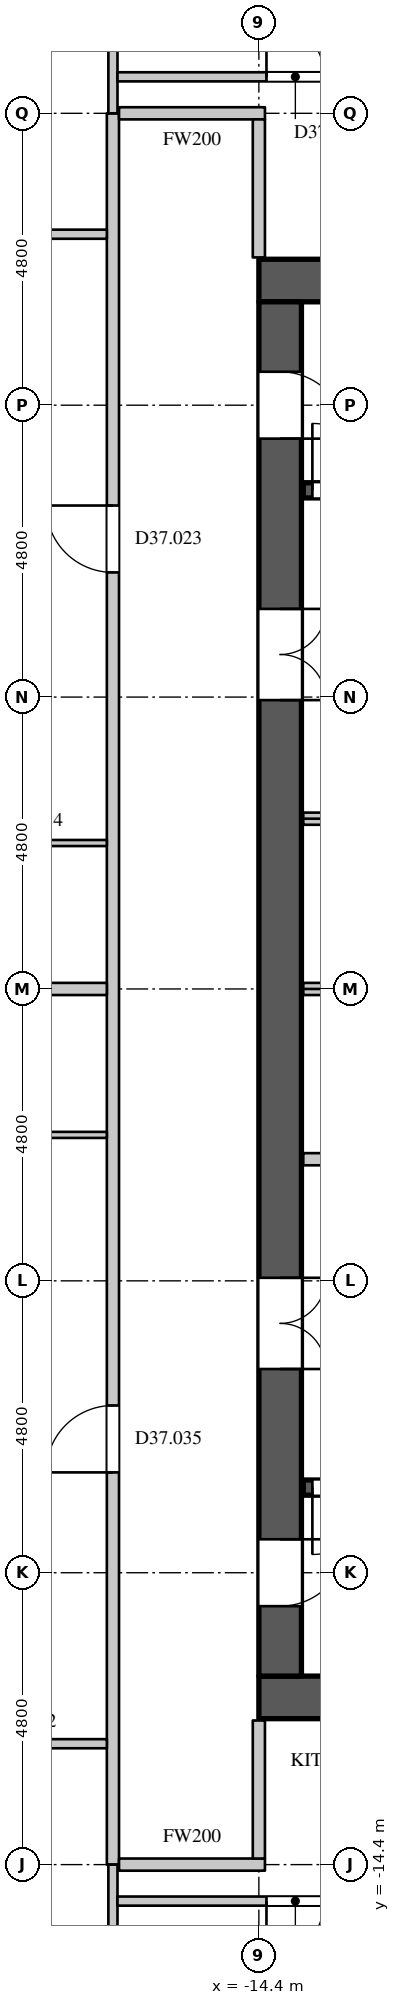
"""IFC4 building model, lengths in metres.
Left out: names, types, materials, properties, quantities, classifications, styles, units other than length and angle.
Written with IfcOpenShell. Run it as: python <this file> out.ifc"""

import sys

from ifc_helpers import new_model, si_unit, direction, frame, frame_2d, origin, place, context, subcontext, project, spatial, rectangle, extrude, element, fill, save


model = new_model("IFC4")
c1 = context("Model", 3, precision=1e-05, world=origin(), true_north=direction((0.0, 1.0)))
c2 = subcontext(c1, "Body", "Model", "MODEL_VIEW")
j1 = project(units=[si_unit("LENGTHUNIT", "METRE"), si_unit("PLANEANGLEUNIT", "RADIAN")], contexts=[c1])
p1 = place(None, origin())
s1 = spatial("IfcSite", under=j1, at=p1, CompositionType="ELEMENT")
p2 = place(p1, origin())
s2 = spatial("IfcBuilding", under=s1, at=p2, CompositionType="ELEMENT")
p3 = place(p2, frame((0.0, 0.0, 162.3)))
s3 = spatial("IfcBuildingStorey", under=s2, at=p3, CompositionType="ELEMENT", Elevation=162.3)
for number, where, z_axis, x_axis in (
    (1, (-14.4, 11.65, 0.0), (0.0, 0.0, 1.0), (1.0, 0.0, 0.0)),
    (2, (-14.4, -11.65, 0.0), (0.0, 0.0, 1.0), (1.0, 0.0, 0.0)),
):
    element("IfcWall", number, at=place(p3, frame(where, z_axis=z_axis, x_axis=x_axis)), inside=s3, PredefinedType="SHEAR", context=c2, shape_type="SweptSolid", body=[
        extrude(rectangle(XDim=28.8, YDim=0.7, at=frame_2d((14.4, 0.0))), origin(), (0.0, 0.0, 1.0), 4.2),
    ])
p4 = place(p3, frame((-14.05, -11.3, 0.0), z_axis=(0.0, 0.0, 1.0), x_axis=(0.0, 1.0, 0.0)))
e3 = element("IfcWall", 3, at=p4, inside=s3, PredefinedType="SHEAR", context=c2, shape_type="SweptSolid", body=[
    extrude(rectangle(XDim=22.6, YDim=0.7, at=frame_2d((11.3, 0.0))), origin(), (0.0, 0.0, 1.0), 4.2),
])
p5 = place(p4, frame((20.35, 0.0, 0.0)))
e4 = element("IfcOpeningElement", 4, at=p5, cuts=e3, PredefinedType="OPENING", context=c2, shape_type="SweptSolid", body=[
    extrude(rectangle(XDim=1.1, YDim=2.2, at=frame_2d((0.55, 1.1))), frame((0.0, 0.36, 0.0), z_axis=(0.0, -1.0, 0.0), x_axis=(1.0, 0.0, 0.0)), (0.0, 0.0, 1.0), 0.72),
])
p6 = place(p4, frame((1.15, 0.0, 0.0)))
e5 = element("IfcOpeningElement", 5, at=p6, cuts=e3, PredefinedType="OPENING", context=c2, shape_type="SweptSolid", body=[
    extrude(rectangle(XDim=1.1, YDim=2.2, at=frame_2d((0.55, 1.1))), frame((0.0, 0.36, 0.0), z_axis=(0.0, -1.0, 0.0), x_axis=(1.0, 0.0, 0.0)), (0.0, 0.0, 1.0), 0.72),
])
p7 = place(p4, frame((16.05, 0.0, 0.0)))
e6 = element("IfcOpeningElement", 6, at=p7, cuts=e3, PredefinedType="OPENING", context=c2, shape_type="SweptSolid", body=[
    extrude(rectangle(XDim=1.5, YDim=2.4, at=frame_2d((0.75, 1.2))), frame((0.0, 0.36, 0.0), z_axis=(0.0, -1.0, 0.0), x_axis=(1.0, 0.0, 0.0)), (0.0, 0.0, 1.0), 0.72),
])
p8 = place(p4, frame((5.05, 0.0, 0.0)))
e7 = element("IfcOpeningElement", 7, at=p8, cuts=e3, PredefinedType="OPENING", context=c2, shape_type="SweptSolid", body=[
    extrude(rectangle(XDim=1.5, YDim=2.4, at=frame_2d((0.75, 1.2))), frame((0.0, 0.36, 0.0), z_axis=(0.0, -1.0, 0.0), x_axis=(1.0, 0.0, 0.0)), (0.0, 0.0, 1.0), 0.72),
])
p9 = place(p3, frame((-16.8, -14.4, 0.0), z_axis=(0.0, 0.0, 1.0), x_axis=(0.0, 1.0, 0.0)))
e8 = element("IfcWall", 8, at=p9, inside=s3, PredefinedType="PARTITIONING", context=c2, shape_type="SweptSolid", body=[
    extrude(rectangle(XDim=28.8, YDim=0.2, at=frame_2d((14.4, 0.0))), origin(), (0.0, 0.0, 1.0), 3.95),
])
p10 = place(p9, frame((21.25, 0.0, 0.0)))
e9 = element("IfcOpeningElement", 9, at=p10, cuts=e8, PredefinedType="OPENING", context=c2, shape_type="SweptSolid", body=[
    extrude(rectangle(XDim=1.1, YDim=2.4, at=frame_2d((0.55, 1.2))), frame((0.0, 0.11, 0.0), z_axis=(0.0, -1.0, 0.0), x_axis=(1.0, 0.0, 0.0)), (0.0, 0.0, 1.0), 0.22),
])
p11 = place(p9, frame((6.45, 0.0, 0.0)))
e10 = element("IfcOpeningElement", 10, at=p11, cuts=e8, PredefinedType="OPENING", context=c2, shape_type="SweptSolid", body=[
    extrude(rectangle(XDim=1.1, YDim=2.4, at=frame_2d((0.55, 1.2))), frame((0.0, 0.11, 0.0), z_axis=(0.0, -1.0, 0.0), x_axis=(1.0, 0.0, 0.0)), (0.0, 0.0, 1.0), 0.22),
])
for number, where, z_axis, x_axis in (
    (11, (-16.7, -14.4, 0.0), (0.0, 0.0, 1.0), (1.0, 0.0, 0.0)),
    (12, (-16.7, 14.4, 0.0), (0.0, 0.0, 1.0), (1.0, 0.0, 0.0)),
):
    element("IfcWall", number, at=place(p3, frame(where, z_axis=z_axis, x_axis=x_axis)), inside=s3, PredefinedType="PARTITIONING", context=c2, shape_type="SweptSolid", body=[
        extrude(rectangle(XDim=2.4, YDim=0.2, at=frame_2d((1.2, 0.0))), origin(), (0.0, 0.0, 1.0), 3.95),
    ])
for number, where, z_axis, x_axis in (
    (13, (-14.4, -14.3, 0.0), (0.0, 0.0, 1.0), (0.0, 1.0, 0.0)),
    (14, (-14.4, 12.03, 0.0), (0.0, 0.0, 1.0), (0.0, 1.0, 0.0)),
):
    element("IfcWall", number, at=place(p3, frame(where, z_axis=z_axis, x_axis=x_axis)), inside=s3, PredefinedType="PARTITIONING", context=c2, shape_type="SweptSolid", body=[
        extrude(rectangle(XDim=2.27, YDim=0.2, at=frame_2d((1.135, 0.0))), origin(), (0.0, 0.0, 1.0), 3.95),
    ])
p12 = place(p3, frame((-22.538, -12.412, 0.0), z_axis=(0.0, 0.0, 1.0), x_axis=(1.0, 0.0, 0.0)))
e15 = element("IfcWall", 15, at=p12, inside=s3, PredefinedType="PARTITIONING", context=c2, shape_type="SweptSolid", body=[
    extrude(rectangle(XDim=5.638, YDim=0.15, at=frame_2d((2.819, 0.0))), origin(), (0.0, 0.0, 1.0), 3.95),
])
p13 = place(p12, frame((3.419, 0.0, 0.0)))
e16 = element("IfcOpeningElement", 16, at=p13, cuts=e15, PredefinedType="OPENING", context=c2, shape_type="SweptSolid", body=[
    extrude(rectangle(XDim=0.95, YDim=2.2, at=frame_2d((0.475, 1.1))), frame((0.0, 0.085, 0.0), z_axis=(0.0, -1.0, 0.0), x_axis=(1.0, 0.0, 0.0)), (0.0, 0.0, 1.0), 0.17),
])
p14 = place(p3, frame((-22.538, 12.412, 0.0), z_axis=(0.0, 0.0, 1.0), x_axis=(1.0, 0.0, 0.0)))
e17 = element("IfcWall", 17, at=p14, inside=s3, PredefinedType="PARTITIONING", context=c2, shape_type="SweptSolid", body=[
    extrude(rectangle(XDim=5.638, YDim=0.15, at=frame_2d((2.819, 0.0))), origin(), (0.0, 0.0, 1.0), 3.95),
])
p15 = place(p14, frame((3.419, 0.0, 0.0)))
e18 = element("IfcOpeningElement", 18, at=p15, cuts=e17, PredefinedType="OPENING", context=c2, shape_type="SweptSolid", body=[
    extrude(rectangle(XDim=0.95, YDim=2.2, at=frame_2d((0.475, 1.1))), frame((0.0, 0.085, 0.0), z_axis=(0.0, -1.0, 0.0), x_axis=(1.0, 0.0, 0.0)), (0.0, 0.0, 1.0), 0.17),
])
p16 = place(p3, frame((-16.8, -18.131, 0.0), z_axis=(0.0, 0.0, 1.0), x_axis=(0.0, 1.0, 0.0)))
e19 = element("IfcWall", 19, at=p16, inside=s3, PredefinedType="PARTITIONING", context=c2, shape_type="SweptSolid", body=[
    extrude(rectangle(XDim=3.731, YDim=0.15, at=frame_2d((1.865, 0.0))), origin(), (0.0, 0.0, 1.0), 3.95),
])
p17 = place(p16, frame((1.15, 0.0, 0.0)))
e20 = element("IfcOpeningElement", 20, at=p17, cuts=e19, PredefinedType="OPENING", context=c2, shape_type="SweptSolid", body=[
    extrude(rectangle(XDim=0.95, YDim=2.2, at=frame_2d((0.475, 1.1))), frame((0.0, 0.085, 0.0), z_axis=(0.0, -1.0, 0.0), x_axis=(1.0, 0.0, 0.0)), (0.0, 0.0, 1.0), 0.17),
])
p18 = place(p3, frame((-16.725, -15.0, 0.0), z_axis=(0.0, 0.0, 1.0), x_axis=(1.0, 0.0, 0.0)))
e21 = element("IfcWall", 21, at=p18, inside=s3, PredefinedType="PARTITIONING", context=c2, shape_type="SweptSolid", body=[
    extrude(rectangle(XDim=5.051, YDim=0.15, at=frame_2d((2.525, 0.0))), origin(), (0.0, 0.0, 1.0), 3.95),
])
p19 = place(p18, frame((2.45, 0.0, 0.0)))
e22 = element("IfcOpeningElement", 22, at=p19, cuts=e21, PredefinedType="OPENING", context=c2, shape_type="SweptSolid", body=[
    extrude(rectangle(XDim=0.95, YDim=2.2, at=frame_2d((0.475, 1.1))), frame((0.0, 0.085, 0.0), z_axis=(0.0, -1.0, 0.0), x_axis=(1.0, 0.0, 0.0)), (0.0, 0.0, 1.0), 0.17),
])
p20 = place(p3, frame((-16.8, 14.4, 0.0), z_axis=(0.0, 0.0, 1.0), x_axis=(0.0, 1.0, 0.0)))
e23 = element("IfcWall", 23, at=p20, inside=s3, PredefinedType="PARTITIONING", context=c2, shape_type="SweptSolid", body=[
    extrude(rectangle(XDim=3.731, YDim=0.15, at=frame_2d((1.865, 0.0))), origin(), (0.0, 0.0, 1.0), 3.95),
])
p21 = place(p20, frame((1.6, 0.0, 0.0)))
e24 = element("IfcOpeningElement", 24, at=p21, cuts=e23, PredefinedType="OPENING", context=c2, shape_type="SweptSolid", body=[
    extrude(rectangle(XDim=0.95, YDim=2.2, at=frame_2d((0.475, 1.1))), frame((0.0, 0.085, 0.0), z_axis=(0.0, -1.0, 0.0), x_axis=(1.0, 0.0, 0.0)), (0.0, 0.0, 1.0), 0.17),
])
p22 = place(p3, frame((-16.725, 15.0, 0.0), z_axis=(0.0, 0.0, 1.0), x_axis=(1.0, 0.0, 0.0)))
e25 = element("IfcWall", 25, at=p22, inside=s3, PredefinedType="PARTITIONING", context=c2, shape_type="SweptSolid", body=[
    extrude(rectangle(XDim=5.051, YDim=0.15, at=frame_2d((2.525, 0.0))), origin(), (0.0, 0.0, 1.0), 3.95),
])
p23 = place(p22, frame((2.45, 0.0, 0.0)))
e26 = element("IfcOpeningElement", 26, at=p23, cuts=e25, PredefinedType="OPENING", context=c2, shape_type="SweptSolid", body=[
    extrude(rectangle(XDim=0.95, YDim=2.2, at=frame_2d((0.475, 1.1))), frame((0.0, 0.085, 0.0), z_axis=(0.0, -1.0, 0.0), x_axis=(1.0, 0.0, 0.0)), (0.0, 0.0, 1.0), 0.17),
])
p24 = place(p3, frame((-24.055, 0.0, 0.0), z_axis=(0.0, 0.0, 1.0), x_axis=(1.0, 0.0, 0.0)))
e27 = element("IfcWall", 27, at=p24, inside=s3, PredefinedType="PARTITIONING", context=c2, shape_type="SweptSolid", body=[
    extrude(rectangle(XDim=7.155, YDim=0.2, at=frame_2d((3.578, 0.0))), origin(), (0.0, 0.0, 1.0), 3.95),
])
p25 = place(p3, frame((-13.67, -2.8, 0.0), z_axis=(0.0, 0.0, 1.0), x_axis=(1.0, 0.0, 0.0)))
e28 = element("IfcWall", 28, at=p25, inside=s3, PredefinedType="PARTITIONING", context=c2, shape_type="SweptSolid", body=[
    extrude(rectangle(XDim=3.27, YDim=0.2, at=frame_2d((1.635, 0.0))), origin(), (0.0, 0.0, 1.0), 3.95),
])
p26 = place(p25, frame((1.3, 0.0, 0.0)))
e29 = element("IfcOpeningElement", 29, at=p26, cuts=e28, PredefinedType="OPENING", context=c2, shape_type="SweptSolid", body=[
    extrude(rectangle(XDim=0.6, YDim=2.0, at=frame_2d((0.3, 1.0))), frame((0.0, 0.11, 0.0), z_axis=(0.0, -1.0, 0.0), x_axis=(1.0, 0.0, 0.0)), (0.0, 0.0, 1.0), 0.22),
])
p27 = place(p3, frame((-13.67, 0.0, 0.0), z_axis=(0.0, 0.0, 1.0), x_axis=(1.0, 0.0, 0.0)))
e30 = element("IfcWall", 30, at=p27, inside=s3, PredefinedType="PARTITIONING", context=c2, shape_type="SweptSolid", body=[
    extrude(rectangle(XDim=21.47, YDim=0.2, at=frame_2d((10.735, 0.0))), origin(), (0.0, 0.0, 1.0), 3.95),
])
p28 = place(p3, frame((-13.67, 2.8, 0.0), z_axis=(0.0, 0.0, 1.0), x_axis=(1.0, 0.0, 0.0)))
e31 = element("IfcWall", 31, at=p28, inside=s3, PredefinedType="PARTITIONING", context=c2, shape_type="SweptSolid", body=[
    extrude(rectangle(XDim=5.85, YDim=0.2, at=frame_2d((2.925, 0.0))), origin(), (0.0, 0.0, 1.0), 3.95),
])
p29 = place(p28, frame((1.05, 0.0, 0.0)))
e32 = element("IfcOpeningElement", 32, at=p29, cuts=e31, PredefinedType="OPENING", context=c2, shape_type="SweptSolid", body=[
    extrude(rectangle(XDim=1.1, YDim=2.2, at=frame_2d((0.55, 1.1))), frame((0.0, 0.11, 0.0), z_axis=(0.0, -1.0, 0.0), x_axis=(1.0, 0.0, 0.0)), (0.0, 0.0, 1.0), 0.22),
])
p30 = place(p28, frame((4.0, 0.0, 0.0)))
e33 = element("IfcOpeningElement", 33, at=p30, cuts=e31, PredefinedType="OPENING", context=c2, shape_type="SweptSolid", body=[
    extrude(rectangle(XDim=1.1, YDim=2.2, at=frame_2d((0.55, 1.1))), frame((0.0, 0.11, 0.0), z_axis=(0.0, -1.0, 0.0), x_axis=(1.0, 0.0, 0.0)), (0.0, 0.0, 1.0), 0.22),
])
p31 = place(p3, frame((-13.67, -8.2, 0.0), z_axis=(0.0, 0.0, 1.0), x_axis=(1.0, 0.0, 0.0)))
e34 = element("IfcWall", 34, at=p31, inside=s3, PredefinedType="SHEAR", context=c2, shape_type="SweptSolid", body=[
    extrude(rectangle(XDim=8.395, YDim=0.25, at=frame_2d((4.198, 0.0))), origin(), (0.0, 0.0, 1.0), 3.95),
])
p32 = place(p31, frame((0.15, 0.0, 0.0)))
e35 = element("IfcOpeningElement", 35, at=p32, cuts=e34, PredefinedType="OPENING", context=c2, shape_type="SweptSolid", body=[
    extrude(rectangle(XDim=1.1, YDim=2.2, at=frame_2d((0.55, 1.1))), frame((0.0, 0.135, 0.0), z_axis=(0.0, -1.0, 0.0), x_axis=(1.0, 0.0, 0.0)), (0.0, 0.0, 1.0), 0.27),
])
p33 = place(p3, frame((-13.67, 8.2, 0.0), z_axis=(0.0, 0.0, 1.0), x_axis=(1.0, 0.0, 0.0)))
e36 = element("IfcWall", 36, at=p33, inside=s3, PredefinedType="SHEAR", context=c2, shape_type="SweptSolid", body=[
    extrude(rectangle(XDim=8.395, YDim=0.25, at=frame_2d((4.198, 0.0))), origin(), (0.0, 0.0, 1.0), 3.95),
])
p34 = place(p33, frame((0.15, 0.0, 0.0)))
e37 = element("IfcOpeningElement", 37, at=p34, cuts=e36, PredefinedType="OPENING", context=c2, shape_type="SweptSolid", body=[
    extrude(rectangle(XDim=1.1, YDim=2.2, at=frame_2d((0.55, 1.1))), frame((0.0, 0.135, 0.0), z_axis=(0.0, -1.0, 0.0), x_axis=(1.0, 0.0, 0.0)), (0.0, 0.0, 1.0), 0.27),
])
p35 = place(p3, frame((-20.125, -2.4, 0.0), z_axis=(0.0, 0.0, 1.0), x_axis=(1.0, 0.0, 0.0)))
e38 = element("IfcWall", 38, at=p35, inside=s3, PredefinedType="PARTITIONING", context=c2, shape_type="SweptSolid", body=[
    extrude(rectangle(XDim=3.225, YDim=0.1, at=frame_2d((1.613, 0.0))), origin(), (0.0, 0.0, 1.0), 3.95),
])
p36 = place(p35, frame((1.15, 0.0, 0.0)))
e39 = element("IfcOpeningElement", 39, at=p36, cuts=e38, PredefinedType="OPENING", context=c2, shape_type="SweptSolid", body=[
    extrude(rectangle(XDim=0.9, YDim=2.2, at=frame_2d((0.45, 1.1))), frame((0.0, 0.06, 0.0), z_axis=(0.0, -1.0, 0.0), x_axis=(1.0, 0.0, 0.0)), (0.0, 0.0, 1.0), 0.12),
])
p37 = place(p3, frame((-20.125, 2.4, 0.0), z_axis=(0.0, 0.0, 1.0), x_axis=(1.0, 0.0, 0.0)))
e40 = element("IfcWall", 40, at=p37, inside=s3, PredefinedType="PARTITIONING", context=c2, shape_type="SweptSolid", body=[
    extrude(rectangle(XDim=3.225, YDim=0.1, at=frame_2d((1.613, 0.0))), origin(), (0.0, 0.0, 1.0), 3.95),
])
p38 = place(p37, frame((1.15, 0.0, 0.0)))
e41 = element("IfcOpeningElement", 41, at=p38, cuts=e40, PredefinedType="OPENING", context=c2, shape_type="SweptSolid", body=[
    extrude(rectangle(XDim=0.9, YDim=2.2, at=frame_2d((0.45, 1.1))), frame((0.0, 0.06, 0.0), z_axis=(0.0, -1.0, 0.0), x_axis=(1.0, 0.0, 0.0)), (0.0, 0.0, 1.0), 0.12),
])
p39 = place(p34, origin())
e42 = element("IfcDoor", 42, at=p39, inside=s3, OperationType="SINGLE_SWING_LEFT", PredefinedType="DOOR", context=c2, shape_type="SweptSolid", body=[
    extrude(rectangle(XDim=1.1, YDim=2.2, at=frame_2d((0.55, 1.1))), frame((0.0, 0.025, 0.0), z_axis=(0.0, -1.0, 0.0), x_axis=(1.0, 0.0, 0.0)), (0.0, 0.0, 1.0), 0.05),
])
fill(e37, e42)
p40 = place(p32, origin())
e43 = element("IfcDoor", 43, at=p40, inside=s3, OperationType="SINGLE_SWING_RIGHT", PredefinedType="DOOR", context=c2, shape_type="SweptSolid", body=[
    extrude(rectangle(XDim=1.1, YDim=2.2, at=frame_2d((0.55, 1.1))), frame((0.0, 0.025, 0.0), z_axis=(0.0, -1.0, 0.0), x_axis=(1.0, 0.0, 0.0)), (0.0, 0.0, 1.0), 0.05),
])
fill(e35, e43)
p41 = place(p5, origin())
e44 = element("IfcDoor", 44, at=p41, inside=s3, OperationType="SINGLE_SWING_RIGHT", PredefinedType="DOOR", context=c2, shape_type="SweptSolid", body=[
    extrude(rectangle(XDim=1.1, YDim=2.2, at=frame_2d((0.55, 1.1))), frame((0.0, -0.295, 0.0), z_axis=(0.0, -1.0, 0.0), x_axis=(1.0, 0.0, 0.0)), (0.0, 0.0, 1.0), 0.05),
])
fill(e4, e44)
p42 = place(p6, origin())
e45 = element("IfcDoor", 45, at=p42, inside=s3, OperationType="SINGLE_SWING_LEFT", PredefinedType="DOOR", context=c2, shape_type="SweptSolid", body=[
    extrude(rectangle(XDim=1.1, YDim=2.2, at=frame_2d((0.55, 1.1))), frame((0.0, -0.295, 0.0), z_axis=(0.0, -1.0, 0.0), x_axis=(1.0, 0.0, 0.0)), (0.0, 0.0, 1.0), 0.05),
])
fill(e5, e45)
p43 = place(p7, origin())
e46 = element("IfcDoor", 46, at=p43, inside=s3, OperationType="DOUBLE_DOOR_SINGLE_SWING", PredefinedType="DOOR", context=c2, shape_type="SweptSolid", body=[
    extrude(rectangle(XDim=1.5, YDim=2.4, at=frame_2d((0.75, 1.2))), frame((0.0, -0.295, 0.0), z_axis=(0.0, -1.0, 0.0), x_axis=(1.0, 0.0, 0.0)), (0.0, 0.0, 1.0), 0.05),
])
fill(e6, e46)
p44 = place(p8, origin())
e47 = element("IfcDoor", 47, at=p44, inside=s3, OperationType="DOUBLE_DOOR_SINGLE_SWING", PredefinedType="DOOR", context=c2, shape_type="SweptSolid", body=[
    extrude(rectangle(XDim=1.5, YDim=2.4, at=frame_2d((0.75, 1.2))), frame((0.0, -0.295, 0.0), z_axis=(0.0, -1.0, 0.0), x_axis=(1.0, 0.0, 0.0)), (0.0, 0.0, 1.0), 0.05),
])
fill(e7, e47)
p45 = place(p10, origin())
e48 = element("IfcDoor", 48, at=p45, inside=s3, OperationType="SINGLE_SWING_RIGHT", PredefinedType="DOOR", context=c2, shape_type="SweptSolid", body=[
    extrude(rectangle(XDim=1.1, YDim=2.4, at=frame_2d((0.55, 1.2))), frame((0.0, 0.025, 0.0), z_axis=(0.0, -1.0, 0.0), x_axis=(1.0, 0.0, 0.0)), (0.0, 0.0, 1.0), 0.05),
])
fill(e9, e48)
p46 = place(p23, origin())
e49 = element("IfcDoor", 49, at=p46, inside=s3, OperationType="SINGLE_SWING_LEFT", PredefinedType="DOOR", context=c2, shape_type="SweptSolid", body=[
    extrude(rectangle(XDim=0.95, YDim=2.2, at=frame_2d((0.475, 1.1))), frame((0.0, 0.025, 0.0), z_axis=(0.0, -1.0, 0.0), x_axis=(1.0, 0.0, 0.0)), (0.0, 0.0, 1.0), 0.05),
])
fill(e26, e49)
p47 = place(p11, origin())
e50 = element("IfcDoor", 50, at=p47, inside=s3, OperationType="SINGLE_SWING_LEFT", PredefinedType="DOOR", context=c2, shape_type="SweptSolid", body=[
    extrude(rectangle(XDim=1.1, YDim=2.4, at=frame_2d((0.55, 1.2))), frame((0.0, 0.025, 0.0), z_axis=(0.0, -1.0, 0.0), x_axis=(1.0, 0.0, 0.0)), (0.0, 0.0, 1.0), 0.05),
])
fill(e10, e50)
p48 = place(p19, origin())
e51 = element("IfcDoor", 51, at=p48, inside=s3, OperationType="SINGLE_SWING_RIGHT", PredefinedType="DOOR", context=c2, shape_type="SweptSolid", body=[
    extrude(rectangle(XDim=0.95, YDim=2.2, at=frame_2d((0.475, 1.1))), frame((0.0, 0.025, 0.0), z_axis=(0.0, -1.0, 0.0), x_axis=(1.0, 0.0, 0.0)), (0.0, 0.0, 1.0), 0.05),
])
fill(e22, e51)
save(model, sys.argv[1])
